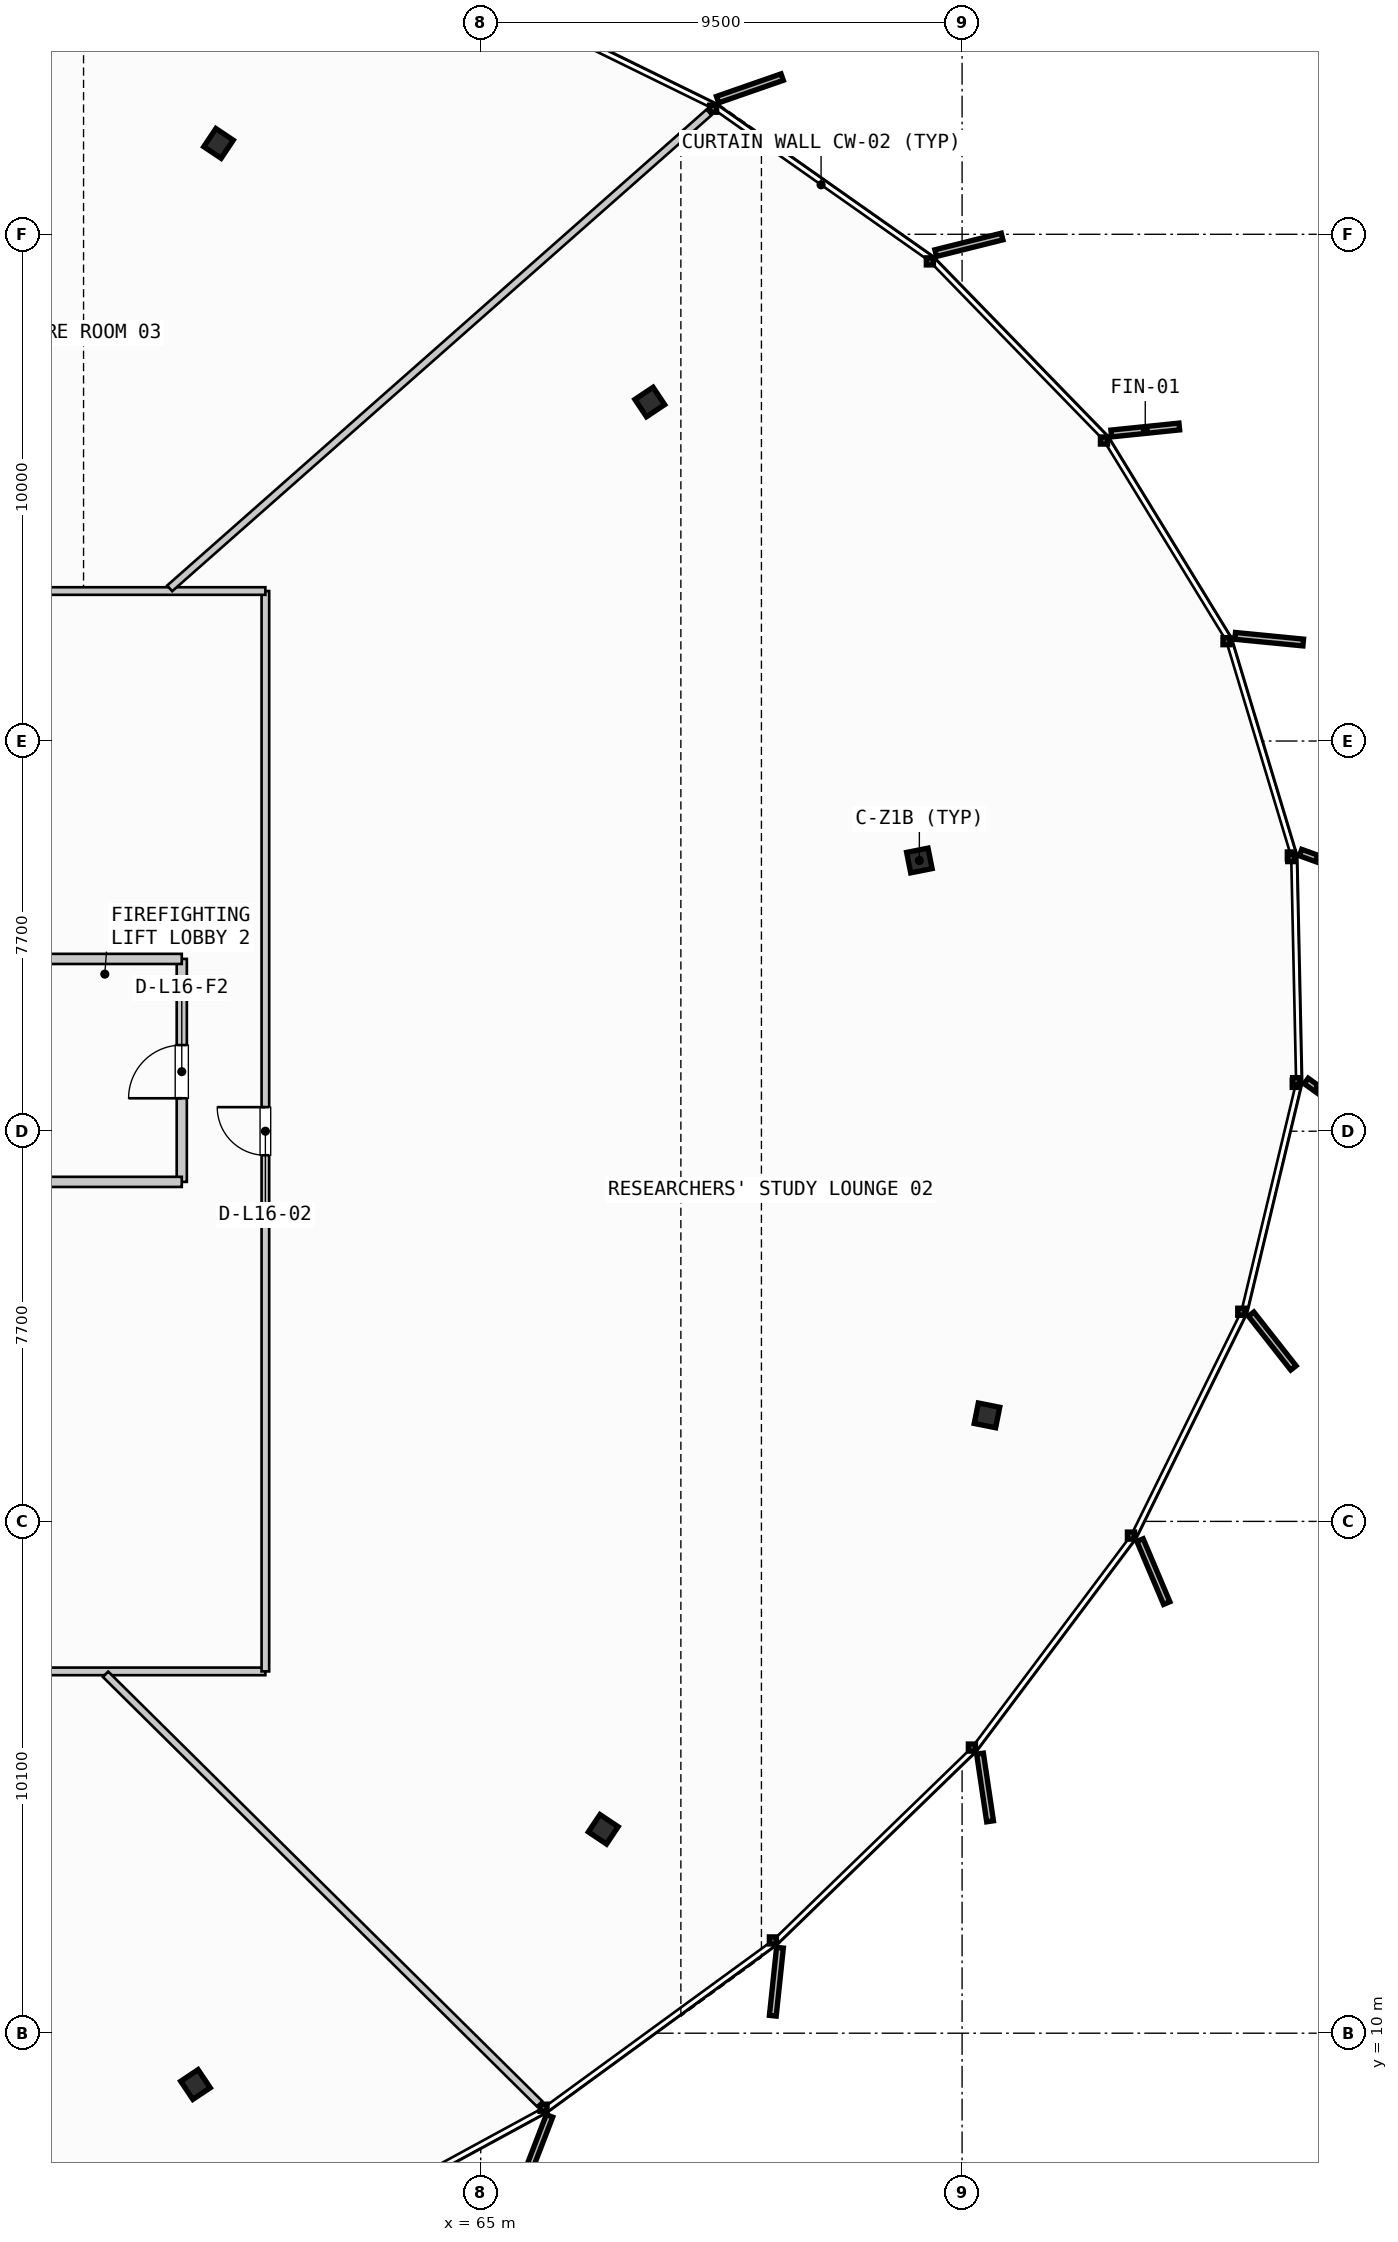
"""IFC4 building model, lengths in metres.
Left out: names, types, materials, properties, quantities, classifications, styles, units other than length and angle.
Written with IfcOpenShell. Run it as: python <this file> out.ifc"""

import sys

from ifc_helpers import new_model, si_unit, direction, frame, frame_2d, origin, origin_2d, place, context, subcontext, project, spatial, rectangle, i_section, extrude, source, transform, mapped, element, fill, save


model = new_model("IFC4")
c1 = context("Model", 3, precision=1e-05, world=origin(), true_north=direction((0.0, 1.0)))
c2 = subcontext(c1, "Body", "Model", "MODEL_VIEW")
j1 = project(units=[si_unit("LENGTHUNIT", "METRE"), si_unit("PLANEANGLEUNIT", "RADIAN")], contexts=[c1])
p1 = place(None, origin())
s1 = spatial("IfcSite", under=j1, at=p1, CompositionType="ELEMENT")
p2 = place(p1, origin())
s2 = spatial("IfcBuilding", under=s1, at=p2, CompositionType="ELEMENT")
p3 = place(p2, frame((0.0, 0.0, 67.6)))
s3 = spatial("IfcBuildingStorey", under=s2, at=p3, CompositionType="ELEMENT", Elevation=67.6)
m1 = source(origin(), c2, "Body", "SweptSolid", [
    extrude(i_section(OverallWidth=0.412, OverallDepth=0.431, WebThickness=0.042, FlangeThickness=0.068, FilletRadius=0.015, at=origin_2d()), origin(), (0.0, 0.0, 1.0), 3.55),
])
for number, where, z_axis, x_axis in (
    (1, (73.657, 33.142, 0.0), (0.0, 0.0, 1.0), (0.981, 0.195, 0.0)),
    (2, (68.336, 42.19, 0.0), (0.0, 0.0, 1.0), (0.831, 0.556, 0.0)),
    (3, (59.825, 47.293, 0.0), (0.0, 0.0, 1.0), (0.556, 0.831, 0.0)),
    (4, (59.37, 8.987, 0.0), (0.0, 0.0, 1.0), (0.556, -0.831, 0.0)),
    (5, (67.418, 14.023, 0.0), (0.0, 0.0, 1.0), (0.831, -0.556, 0.0)),
    (6, (74.991, 22.192, 0.0), (0.0, 0.0, 1.0), (0.981, -0.195, 0.0)),
):
    element("IfcColumn", number, at=place(p3, frame(where, z_axis=z_axis, x_axis=x_axis)), inside=s3, PredefinedType="COLUMN", context=c2, shape_type="MappedRepresentation", body=[
        mapped(m1, transform((0.0, 0.0, 0.0), scale=1.0)),
    ])
p4 = place(p3, frame((59.1, 26.8, 0.0), z_axis=(0.0, 0.0, 1.0), x_axis=(0.0, 1.0, 0.0)))
e7 = element("IfcWall", 7, at=p4, inside=s3, PredefinedType="PARTITIONING", context=c2, shape_type="SweptSolid", body=[
    extrude(rectangle(XDim=4.4, YDim=0.2, at=frame_2d((2.2, 0.0))), origin(), (0.0, 0.0, 1.0), 2.505),
])
p5 = place(p4, frame((1.65, 0.0, 0.0)))
e8 = element("IfcOpeningElement", 8, at=p5, cuts=e7, PredefinedType="OPENING", context=c2, shape_type="SweptSolid", body=[
    extrude(rectangle(XDim=1.05, YDim=2.15, at=frame_2d((0.525, 1.075))), frame((0.0, 0.11, 0.0), z_axis=(0.0, -1.0, 0.0), x_axis=(1.0, 0.0, 0.0)), (0.0, 0.0, 1.0), 0.22),
])
for number, where, z_axis, x_axis in (
    (9, (55.96, 26.8, 0.0), (0.0, 0.0, 1.0), (1.0, 0.0, 0.0)),
    (10, (55.96, 31.2, 0.0), (0.0, 0.0, 1.0), (1.0, 0.0, 0.0)),
):
    element("IfcWall", number, at=place(p3, frame(where, z_axis=z_axis, x_axis=x_axis)), inside=s3, PredefinedType="PARTITIONING", context=c2, shape_type="SweptSolid", body=[
        extrude(rectangle(XDim=3.14, YDim=0.2, at=frame_2d((1.57, 0.0))), origin(), (0.0, 0.0, 1.0), 2.505),
    ])
p6 = place(p3, frame((31.29, 17.14, 0.0), z_axis=(0.0, 0.0, 1.0), x_axis=(1.0, 0.0, 0.0)))
e11 = element("IfcWall", 11, at=p6, inside=s3, PredefinedType="PARTITIONING", context=c2, shape_type="SweptSolid", body=[
    extrude(rectangle(XDim=29.46, YDim=0.15, at=frame_2d((14.73, 0.0))), origin(), (0.0, 0.0, 1.0), 2.505),
])
p7 = place(p6, frame((12.998, 0.0, 0.0)))
e12 = element("IfcOpeningElement", 12, at=p7, cuts=e11, PredefinedType="OPENING", context=c2, shape_type="SweptSolid", body=[
    extrude(rectangle(XDim=0.95, YDim=2.15, at=frame_2d((0.475, 1.075))), frame((0.0, 0.085, 0.0), z_axis=(0.0, -1.0, 0.0), x_axis=(1.0, 0.0, 0.0)), (0.0, 0.0, 1.0), 0.17),
])
p8 = place(p3, frame((60.75, 17.14, 0.0), z_axis=(0.0, 0.0, 1.0), x_axis=(0.0, 1.0, 0.0)))
e13 = element("IfcWall", 13, at=p8, inside=s3, PredefinedType="PARTITIONING", context=c2, shape_type="SweptSolid", body=[
    extrude(rectangle(XDim=21.32, YDim=0.15, at=frame_2d((10.66, 0.0))), origin(), (0.0, 0.0, 1.0), 2.505),
])
p9 = place(p8, frame((10.185, 0.0, 0.0)))
e14 = element("IfcOpeningElement", 14, at=p9, cuts=e13, PredefinedType="OPENING", context=c2, shape_type="SweptSolid", body=[
    extrude(rectangle(XDim=0.95, YDim=2.15, at=frame_2d((0.475, 1.075))), frame((0.0, 0.085, 0.0), z_axis=(0.0, -1.0, 0.0), x_axis=(1.0, 0.0, 0.0)), (0.0, 0.0, 1.0), 0.17),
])
p10 = place(p3, frame((60.75, 38.46, 0.0), z_axis=(0.0, 0.0, 1.0), x_axis=(-1.0, 0.0, 0.0)))
e15 = element("IfcWall", 15, at=p10, inside=s3, PredefinedType="PARTITIONING", context=c2, shape_type="SweptSolid", body=[
    extrude(rectangle(XDim=29.46, YDim=0.15, at=frame_2d((14.73, 0.0))), origin(), (0.0, 0.0, 1.0), 2.505),
])
p11 = place(p10, frame((7.091, 0.0, 0.0)))
e16 = element("IfcOpeningElement", 16, at=p11, cuts=e15, PredefinedType="OPENING", context=c2, shape_type="SweptSolid", body=[
    extrude(rectangle(XDim=0.95, YDim=2.15, at=frame_2d((0.475, 1.075))), frame((0.0, 0.085, 0.0), z_axis=(0.0, -1.0, 0.0), x_axis=(1.0, 0.0, 0.0)), (0.0, 0.0, 1.0), 0.17),
])
p12 = place(p10, frame((20.628, 0.0, 0.0)))
e17 = element("IfcOpeningElement", 17, at=p12, cuts=e15, PredefinedType="OPENING", context=c2, shape_type="SweptSolid", body=[
    extrude(rectangle(XDim=0.95, YDim=2.15, at=frame_2d((0.475, 1.075))), frame((0.0, 0.085, 0.0), z_axis=(0.0, -1.0, 0.0), x_axis=(1.0, 0.0, 0.0)), (0.0, 0.0, 1.0), 0.17),
])
p13 = place(p3, frame((57.595, 17.084, 0.0), z_axis=(0.0, 0.0, 1.0), x_axis=(0.710794315571, -0.703399915377, 0.0)))
e18 = element("IfcWall", 18, at=p13, inside=s3, PredefinedType="PARTITIONING", context=c2, shape_type="SweptSolid", body=[
    extrude(rectangle(XDim=12.051, YDim=0.15, at=frame_2d((6.026, 0.0))), origin(), (0.0, 0.0, 1.0), 2.505),
])
p14 = place(p3, frame((58.862, 38.513, 0.0), z_axis=(0.0, 0.0, 1.0), x_axis=(0.749751511965, 0.661719480071, 0.0)))
e19 = element("IfcWall", 19, at=p14, inside=s3, PredefinedType="PARTITIONING", context=c2, shape_type="SweptSolid", body=[
    extrude(rectangle(XDim=14.194, YDim=0.15, at=frame_2d((7.097, 0.0))), origin(), (0.0, 0.0, 1.0), 2.505),
])
m2 = source(origin(), c2, "Body", "SweptSolid", [
    extrude(rectangle(XDim=1.05, YDim=2.15, at=frame_2d((0.525, 1.075))), frame((0.0, 0.025, 0.0), z_axis=(0.0, -1.0, 0.0), x_axis=(1.0, 0.0, 0.0)), (0.0, 0.0, 1.0), 0.05),
])
p15 = place(p5, origin())
e20 = element("IfcDoor", 20, at=p15, inside=s3, OperationType="SINGLE_SWING_LEFT", PredefinedType="DOOR", context=c2, shape_type="MappedRepresentation", body=[
    mapped(m2, transform((0.0, 0.0, 0.0), scale=1.0)),
])
fill(e8, e20)
m3 = source(origin(), c2, "Body", "SweptSolid", [
    extrude(rectangle(XDim=0.95, YDim=2.15, at=frame_2d((0.475, 1.075))), frame((0.0, 0.025, 0.0), z_axis=(0.0, -1.0, 0.0), x_axis=(1.0, 0.0, 0.0)), (0.0, 0.0, 1.0), 0.05),
])
p16 = place(p9, origin())
e21 = element("IfcDoor", 21, at=p16, inside=s3, OperationType="SINGLE_SWING_RIGHT", PredefinedType="DOOR", context=c2, shape_type="MappedRepresentation", body=[
    mapped(m3, transform((0.0, 0.0, 0.0), scale=1.0)),
])
fill(e14, e21)
save(model, sys.argv[1])
